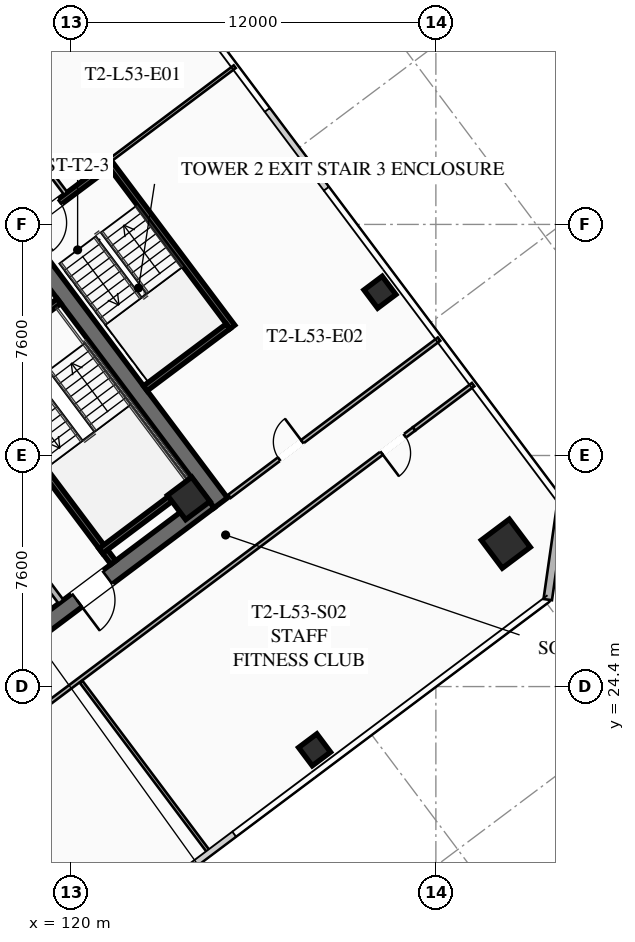
"""IFC4 building model, lengths in metres.
Left out: names, types, materials, properties, quantities, classifications, styles, units other than length and angle.
Written with IfcOpenShell. Run it as: python <this file> out.ifc"""

import sys

from ifc_helpers import new_model, si_unit, direction, frame, frame_2d, origin, origin_2d, place, context, subcontext, project, spatial, rectangle, hollow_rectangle, extrude, element, fill, save


model = new_model("IFC4")
c1 = context("Model", 3, precision=1e-05, world=origin(), true_north=direction((0.0, 1.0)))
c2 = subcontext(c1, "Body", "Model", "MODEL_VIEW")
j1 = project(units=[si_unit("LENGTHUNIT", "METRE"), si_unit("PLANEANGLEUNIT", "RADIAN")], contexts=[c1])
p1 = place(None, origin())
s1 = spatial("IfcSite", under=j1, at=p1, CompositionType="ELEMENT")
p2 = place(p1, origin())
s2 = spatial("IfcBuilding", under=s1, at=p2, CompositionType="ELEMENT")
p3 = place(p2, frame((0.0, 0.0, 196.05)))
s3 = spatial("IfcBuildingStorey", under=s2, at=p3, CompositionType="ELEMENT", Elevation=196.05)
p4 = place(p3, frame((115.564, 42.923, 0.0), z_axis=(0.0, 0.0, 1.0), x_axis=(0.600005007985, -0.799996243986, 0.0)))
e1 = element("IfcWall", 1, at=p4, inside=s3, PredefinedType="SHEAR", context=c2, shape_type="SweptSolid", body=[
    extrude(rectangle(XDim=15.6, YDim=0.55, at=frame_2d((7.8, 0.0))), origin(), (0.0, 0.0, 1.0), 3.55),
])
p5 = place(p3, frame((124.539, 30.498, 0.0), z_axis=(0.0, 0.0, 1.0), x_axis=(-0.799998054672, -0.600002593761, 0.0)))
e2 = element("IfcWall", 2, at=p5, inside=s3, PredefinedType="SHEAR", context=c2, shape_type="SweptSolid", body=[
    extrude(rectangle(XDim=15.06, YDim=0.55, at=frame_2d((7.53, 0.0))), origin(), (0.0, 0.0, 1.0), 3.55),
])
p6 = place(p5, frame((9.23, 0.0, 0.0)))
e3 = element("IfcOpeningElement", 3, at=p6, cuts=e2, PredefinedType="OPENING", context=c2, shape_type="SweptSolid", body=[
    extrude(rectangle(XDim=1.25, YDim=2.25, at=frame_2d((0.625, 1.125))), frame((0.0, 0.285, 0.0), z_axis=(0.0, -1.0, 0.0), x_axis=(1.0, 0.0, 0.0)), (0.0, 0.0, 1.0), 0.57),
])
p7 = place(p5, frame((4.18, 0.0, 0.0)))
e4 = element("IfcOpeningElement", 4, at=p7, cuts=e2, PredefinedType="OPENING", context=c2, shape_type="SweptSolid", body=[
    extrude(rectangle(XDim=1.25, YDim=2.25, at=frame_2d((0.625, 1.125))), frame((0.0, 0.285, 0.0), z_axis=(0.0, -1.0, 0.0), x_axis=(1.0, 0.0, 0.0)), (0.0, 0.0, 1.0), 0.57),
])
p8 = place(p3, frame((123.87, 30.59, 0.0), z_axis=(0.0, 0.0, 1.0), x_axis=(0.799999996291, 0.600000004945, 0.0)))
e5 = element("IfcColumn", 5, at=p8, inside=s3, PredefinedType="COLUMN", context=c2, shape_type="SweptSolid", body=[
    extrude(hollow_rectangle(XDim=1.0, YDim=1.0, WallThickness=0.04, at=origin_2d()), origin(), (0.0, 0.0, 1.0), 3.25),
])
p9 = place(p3, frame((134.3, 29.1, 0.0), z_axis=(0.0, 0.0, 1.0), x_axis=(0.799999996291, 0.600000004945, 0.0)))
e6 = element("IfcColumn", 6, at=p9, inside=s3, PredefinedType="COLUMN", context=c2, shape_type="SweptSolid", body=[
    extrude(hollow_rectangle(XDim=1.15, YDim=1.15, WallThickness=0.045, at=origin_2d()), origin(), (0.0, 0.0, 1.0), 3.25),
])
for number, where, z_axis, x_axis in (
    (7, (128.01, 22.32, 0.0), (0.0, 0.0, 1.0), (0.8, 0.6, 0.0)),
    (8, (130.16, 37.37, 0.0), (0.0, 0.0, 1.0), (0.8, 0.6, 0.0)),
):
    element("IfcColumn", number, at=place(p3, frame(where, z_axis=z_axis, x_axis=x_axis)), inside=s3, PredefinedType="COLUMN", context=c2, shape_type="SweptSolid", body=[
        extrude(hollow_rectangle(XDim=0.75, YDim=0.75, WallThickness=0.032, at=origin_2d()), origin(), (0.0, 0.0, 1.0), 3.25),
    ])
p10 = place(p3, frame((136.14, 30.48, 0.0), z_axis=(0.0, 0.0, 1.0), x_axis=(-0.141410847992, -0.989950994782, 0.0)))
e9 = element("IfcWall", 9, at=p10, inside=s3, PredefinedType="SOLIDWALL", context=c2, shape_type="SweptSolid", body=[
    extrude(rectangle(XDim=3.253, YDim=0.28, at=frame_2d((1.626, 0.0))), origin(), (0.0, 0.0, 1.0), 3.25),
])
p11 = place(p3, frame((116.56, 34.92, 0.0), z_axis=(0.0, 0.0, 1.0), x_axis=(0.59999029481, -0.8000072788, 0.0)))
e10 = element("IfcWall", 10, at=p11, inside=s3, PredefinedType="SHEAR", context=c2, shape_type="SweptSolid", body=[
    extrude(rectangle(XDim=8.05, YDim=0.2, at=frame_2d((4.025, 0.0))), origin(), (0.0, 0.0, 1.0), 3.25),
])
p12 = place(p11, frame((0.45, 0.0, 0.0)))
e11 = element("IfcOpeningElement", 11, at=p12, cuts=e10, PredefinedType="OPENING", context=c2, shape_type="SweptSolid", body=[
    extrude(rectangle(XDim=1.15, YDim=2.2, at=frame_2d((0.575, 1.1))), frame((0.0, 0.11, 0.0), z_axis=(0.0, -1.0, 0.0), x_axis=(1.0, 0.0, 0.0)), (0.0, 0.0, 1.0), 0.22),
])
for number, where, z_axis, x_axis in (
    (12, (116.54, 34.78, 0.0), (0.0, 0.0, 1.0), (0.8, 0.6, 0.0)),
    (13, (120.98, 28.86, 0.0), (0.0, 0.0, 1.0), (0.8, 0.6, 0.0)),
):
    element("IfcWall", number, at=place(p3, frame(where, z_axis=z_axis, x_axis=x_axis)), inside=s3, PredefinedType="SHEAR", context=c2, shape_type="SweptSolid", body=[
        extrude(rectangle(XDim=3.83, YDim=0.2, at=frame_2d((1.915, 0.0))), origin(), (0.0, 0.0, 1.0), 3.25),
    ])
p13 = place(p3, frame((119.67, 27.19, 0.0), z_axis=(0.0, 0.0, 1.0), x_axis=(-0.599988677396, 0.800008491828, 0.0)))
e14 = element("IfcWall", 14, at=p13, inside=s3, PredefinedType="SOLIDWALL", context=c2, shape_type="SweptSolid", body=[
    extrude(rectangle(XDim=6.9, YDim=0.2, at=frame_2d((3.45, 0.0))), origin(), (0.0, 0.0, 1.0), 2.393),
])
p14 = place(p13, frame((0.85, 0.0, 0.0)))
e15 = element("IfcOpeningElement", 15, at=p14, cuts=e14, PredefinedType="OPENING", context=c2, shape_type="SweptSolid", body=[
    extrude(rectangle(XDim=0.95, YDim=2.05, at=frame_2d((0.475, 1.025))), frame((0.0, 0.11, 0.0), z_axis=(0.0, -1.0, 0.0), x_axis=(1.0, 0.0, 0.0)), (0.0, 0.0, 1.0), 0.22),
])
p15 = place(p13, frame((4.8, 0.0, 0.0)))
e16 = element("IfcOpeningElement", 16, at=p15, cuts=e14, PredefinedType="OPENING", context=c2, shape_type="SweptSolid", body=[
    extrude(rectangle(XDim=1.05, YDim=2.2, at=frame_2d((0.525, 1.1))), frame((0.0, 0.11, 0.0), z_axis=(0.0, -1.0, 0.0), x_axis=(1.0, 0.0, 0.0)), (0.0, 0.0, 1.0), 0.22),
])
p16 = place(p3, frame((125.304, 36.228, 0.0), z_axis=(0.0, 0.0, 1.0), x_axis=(-0.59998851072, 0.800008616831, 0.0)))
e17 = element("IfcWall", 17, at=p16, inside=s3, PredefinedType="SHEAR", context=c2, shape_type="SweptSolid", body=[
    extrude(rectangle(XDim=6.8, YDim=0.2, at=frame_2d((3.4, 0.0))), origin(), (0.0, 0.0, 1.0), 3.25),
])
p17 = place(p3, frame((121.204, 41.528, 0.0), z_axis=(0.0, 0.0, 1.0), x_axis=(-0.800017232136, -0.599977023131, 0.0)))
e18 = element("IfcWall", 18, at=p17, inside=s3, PredefinedType="SHEAR", context=c2, shape_type="SweptSolid", body=[
    extrude(rectangle(XDim=3.4, YDim=0.2, at=frame_2d((1.7, 0.0))), origin(), (0.0, 0.0, 1.0), 3.25),
])
p18 = place(p17, frame((1.975, 0.0, 0.0)))
e19 = element("IfcOpeningElement", 19, at=p18, cuts=e18, PredefinedType="OPENING", context=c2, shape_type="SweptSolid", body=[
    extrude(rectangle(XDim=1.15, YDim=2.2, at=frame_2d((0.575, 1.1))), frame((0.0, 0.11, 0.0), z_axis=(0.0, -1.0, 0.0), x_axis=(1.0, 0.0, 0.0)), (0.0, 0.0, 1.0), 0.22),
])
p19 = place(p3, frame((122.444, 34.208, 0.0), z_axis=(0.0, 0.0, 1.0), x_axis=(0.79999138319, 0.600011488909, 0.0)))
e20 = element("IfcWall", 20, at=p19, inside=s3, PredefinedType="SHEAR", context=c2, shape_type="SweptSolid", body=[
    extrude(rectangle(XDim=3.4, YDim=0.2, at=frame_2d((1.7, 0.0))), origin(), (0.0, 0.0, 1.0), 3.25),
])
p20 = place(p3, frame((119.824, 40.618, 0.0), z_axis=(0.0, 0.0, 1.0), x_axis=(-0.599982243973, 0.800013316712, 0.0)))
e21 = element("IfcWall", 21, at=p20, inside=s3, PredefinedType="PARTITIONING", context=c2, shape_type="SweptSolid", body=[
    extrude(rectangle(XDim=4.4, YDim=0.135, at=frame_2d((2.2, 0.0))), origin(), (0.0, 0.0, 1.0), 2.393),
])
p21 = place(p3, frame((96.91, 30.87, 0.0), z_axis=(0.0, 0.0, 1.0), x_axis=(0.800003062365, 0.599995916825, 0.0)))
e22 = element("IfcWall", 22, at=p21, inside=s3, PredefinedType="PARTITIONING", context=c2, shape_type="SweptSolid", body=[
    extrude(rectangle(XDim=28.7, YDim=0.135, at=frame_2d((14.35, 0.0))), origin(), (0.0, 0.0, 1.0), 2.393),
])
p22 = place(p21, frame((0.3, 0.0, 0.0)))
e23 = element("IfcOpeningElement", 23, at=p22, cuts=e22, PredefinedType="OPENING", context=c2, shape_type="SweptSolid", body=[
    extrude(rectangle(XDim=0.95, YDim=2.05, at=frame_2d((0.475, 1.025))), frame((0.0, 0.077, 0.0), z_axis=(0.0, -1.0, 0.0), x_axis=(1.0, 0.0, 0.0)), (0.0, 0.0, 1.0), 0.155),
])
p23 = place(p21, frame((27.45, 0.0, 0.0)))
e24 = element("IfcOpeningElement", 24, at=p23, cuts=e22, PredefinedType="OPENING", context=c2, shape_type="SweptSolid", body=[
    extrude(rectangle(XDim=0.95, YDim=2.05, at=frame_2d((0.475, 1.025))), frame((0.0, 0.077, 0.0), z_axis=(0.0, -1.0, 0.0), x_axis=(1.0, 0.0, 0.0)), (0.0, 0.0, 1.0), 0.155),
])
p24 = place(p3, frame((131.282, 32.874, 0.0), z_axis=(0.0, 0.0, 1.0), x_axis=(-0.8, -0.6, 0.0)))
e25 = element("IfcWall", 25, at=p24, inside=s3, PredefinedType="PARTITIONING", context=c2, shape_type="SweptSolid", body=[
    extrude(rectangle(XDim=28.7, YDim=0.135, at=frame_2d((14.35, 0.0))), origin(), (0.0, 0.0, 1.0), 2.393),
])
p25 = place(p24, frame((27.37, 0.0, 0.0)))
e26 = element("IfcOpeningElement", 26, at=p25, cuts=e25, PredefinedType="OPENING", context=c2, shape_type="SweptSolid", body=[
    extrude(rectangle(XDim=0.95, YDim=2.05, at=frame_2d((0.475, 1.025))), frame((0.0, 0.077, 0.0), z_axis=(0.0, -1.0, 0.0), x_axis=(1.0, 0.0, 0.0)), (0.0, 0.0, 1.0), 0.155),
])
p26 = place(p24, frame((0.38, 0.0, 0.0)))
e27 = element("IfcOpeningElement", 27, at=p26, cuts=e25, PredefinedType="OPENING", context=c2, shape_type="SweptSolid", body=[
    extrude(rectangle(XDim=0.95, YDim=2.05, at=frame_2d((0.475, 1.025))), frame((0.0, 0.077, 0.0), z_axis=(0.0, -1.0, 0.0), x_axis=(1.0, 0.0, 0.0)), (0.0, 0.0, 1.0), 0.155),
])
p27 = place(p3, frame((131.282, 32.874, 0.0), z_axis=(0.0, 0.0, 1.0), x_axis=(0.800012055778, 0.599983925293, 0.0)))
e28 = element("IfcWall", 28, at=p27, inside=s3, PredefinedType="PARTITIONING", context=c2, shape_type="SweptSolid", body=[
    extrude(rectangle(XDim=2.43, YDim=0.135, at=frame_2d((1.215, 0.0))), origin(), (0.0, 0.0, 1.0), 2.393),
])
p28 = place(p3, frame((124.548, 18.936, 0.0), z_axis=(0.0, 0.0, 1.0), x_axis=(-0.6, 0.8, 0.0)))
e29 = element("IfcWall", 29, at=p28, inside=s3, PredefinedType="PARTITIONING", context=c2, shape_type="SweptSolid", body=[
    extrude(rectangle(XDim=7.03, YDim=0.11, at=frame_2d((3.515, 0.0))), origin(), (0.0, 0.0, 1.0), 2.393),
])
p29 = place(p3, frame((122.744, 48.308, 0.0), z_axis=(0.0, 0.0, 1.0), x_axis=(-0.79997892247, -0.600028102345, 0.0)))
e30 = element("IfcWall", 30, at=p29, inside=s3, PredefinedType="PARTITIONING", context=c2, shape_type="SweptSolid", body=[
    extrude(rectangle(XDim=6.95, YDim=0.135, at=frame_2d((3.475, 0.0))), origin(), (0.0, 0.0, 1.0), 2.393),
])
p30 = place(p29, frame((3.35, 0.0, 0.0)))
e31 = element("IfcOpeningElement", 31, at=p30, cuts=e30, PredefinedType="OPENING", context=c2, shape_type="SweptSolid", body=[
    extrude(rectangle(XDim=0.95, YDim=2.05, at=frame_2d((0.475, 1.025))), frame((0.0, 0.077, 0.0), z_axis=(0.0, -1.0, 0.0), x_axis=(1.0, 0.0, 0.0)), (0.0, 0.0, 1.0), 0.155),
])
p31 = place(p3, frame((125.208, 30.656, 0.0), z_axis=(0.0, 0.0, 1.0), x_axis=(0.800006797429, 0.599990936654, 0.0)))
e32 = element("IfcWall", 32, at=p31, inside=s3, PredefinedType="PARTITIONING", context=c2, shape_type="SweptSolid", body=[
    extrude(rectangle(XDim=8.62, YDim=0.135, at=frame_2d((4.31, 0.0))), origin(), (0.0, 0.0, 1.0), 2.393),
])
p32 = place(p31, frame((2.045, 0.0, 0.0)))
e33 = element("IfcOpeningElement", 33, at=p32, cuts=e32, PredefinedType="OPENING", context=c2, shape_type="SweptSolid", body=[
    extrude(rectangle(XDim=0.95, YDim=2.05, at=frame_2d((0.475, 1.025))), frame((0.0, 0.077, 0.0), z_axis=(0.0, -1.0, 0.0), x_axis=(1.0, 0.0, 0.0)), (0.0, 0.0, 1.0), 0.155),
])
p33 = place(p3, frame((125.384, 44.788, 0.0), z_axis=(0.0, 0.0, 1.0), x_axis=(-0.8, -0.6, 0.0)))
e34 = element("IfcWall", 34, at=p33, inside=s3, PredefinedType="PARTITIONING", context=c2, shape_type="SweptSolid", body=[
    extrude(rectangle(XDim=5.1, YDim=0.11, at=frame_2d((2.55, 0.0))), origin(), (0.0, 0.0, 1.0), 2.393),
])
p34 = place(p7, origin())
e35 = element("IfcDoor", 35, at=p34, inside=s3, OperationType="SINGLE_SWING_RIGHT", PredefinedType="DOOR", context=c2, shape_type="SweptSolid", body=[
    extrude(rectangle(XDim=1.25, YDim=2.25, at=frame_2d((0.625, 1.125))), frame((0.0, 0.025, 0.0), z_axis=(0.0, -1.0, 0.0), x_axis=(1.0, 0.0, 0.0)), (0.0, 0.0, 1.0), 0.05),
])
fill(e4, e35)
p35 = place(p18, origin())
e36 = element("IfcDoor", 36, at=p35, inside=s3, OperationType="SINGLE_SWING_RIGHT", PredefinedType="DOOR", context=c2, shape_type="SweptSolid", body=[
    extrude(rectangle(XDim=1.15, YDim=2.2, at=frame_2d((0.575, 1.1))), frame((0.0, 0.025, 0.0), z_axis=(0.0, -1.0, 0.0), x_axis=(1.0, 0.0, 0.0)), (0.0, 0.0, 1.0), 0.05),
])
fill(e19, e36)
p36 = place(p26, origin())
e37 = element("IfcDoor", 37, at=p36, inside=s3, OperationType="SINGLE_SWING_RIGHT", PredefinedType="DOOR", context=c2, shape_type="SweptSolid", body=[
    extrude(rectangle(XDim=0.95, YDim=2.05, at=frame_2d((0.475, 1.025))), frame((0.0, 0.025, 0.0), z_axis=(0.0, -1.0, 0.0), x_axis=(1.0, 0.0, 0.0)), (0.0, 0.0, 1.0), 0.05),
])
fill(e27, e37)
p37 = place(p32, origin())
e38 = element("IfcDoor", 38, at=p37, inside=s3, OperationType="SINGLE_SWING_RIGHT", PredefinedType="DOOR", context=c2, shape_type="SweptSolid", body=[
    extrude(rectangle(XDim=0.95, YDim=2.05, at=frame_2d((0.475, 1.025))), frame((0.0, 0.025, 0.0), z_axis=(0.0, -1.0, 0.0), x_axis=(1.0, 0.0, 0.0)), (0.0, 0.0, 1.0), 0.05),
])
fill(e33, e38)
save(model, sys.argv[1])
